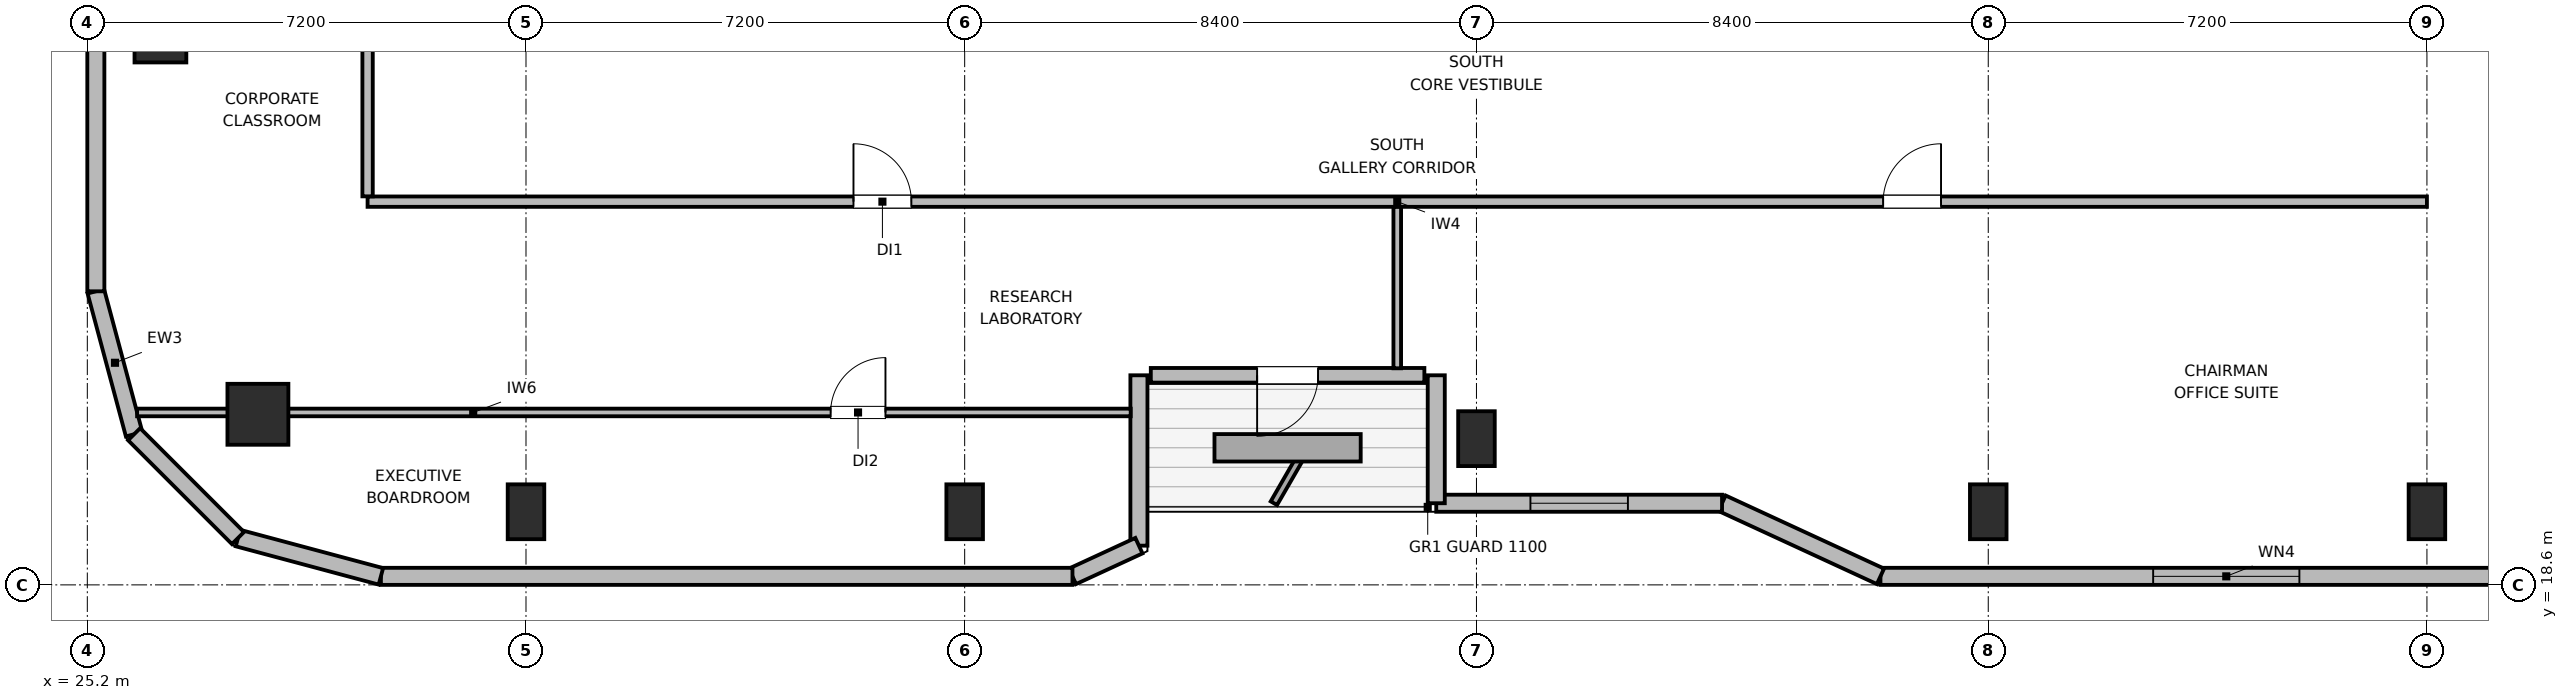
"""IFC4 building model, lengths in metres.
Left out: names, types, materials, properties, quantities, classifications, styles, units other than length and angle.
Written with IfcOpenShell. Run it as: python <this file> out.ifc"""

import sys

from ifc_helpers import new_model, si_unit, direction, frame, frame_2d, origin, origin_2d, place, context, subcontext, project, spatial, rectangle, circle, extrude, element, fill, save


model = new_model("IFC4")
c1 = context("Model", 3, precision=1e-05, world=origin(), true_north=direction((0.0, 1.0)))
c2 = subcontext(c1, "Body", "Model", "MODEL_VIEW")
j1 = project(units=[si_unit("LENGTHUNIT", "METRE"), si_unit("PLANEANGLEUNIT", "RADIAN")], contexts=[c1])
p1 = place(None, origin())
s1 = spatial("IfcSite", under=j1, at=p1, CompositionType="ELEMENT")
p2 = place(p1, origin())
s2 = spatial("IfcBuilding", under=s1, at=p2, CompositionType="ELEMENT")
p3 = place(p2, frame((0.0, 0.0, 342.0)))
s3 = spatial("IfcBuildingStorey", under=s2, at=p3, CompositionType="ELEMENT", Elevation=342.0)
p4 = place(p3, frame((28.0, 21.4, 0.0), z_axis=(0.0, 0.0, 1.0), x_axis=(1.0, 0.0, 0.0)))
e1 = element("IfcColumn", 1, at=p4, inside=s3, PredefinedType="COLUMN", context=c2, shape_type="SweptSolid", body=[
    extrude(circle(Radius=0.5, at=origin_2d()), origin(), (0.0, 0.0, 1.0), 4.5),
])
for number, where, z_axis, x_axis in (
    (2, (32.4, 19.8, 0.0), (0.0, 0.0, 1.0), (1.0, 0.0, 0.0)),
    (3, (39.6, 19.8, 0.0), (0.0, 0.0, 1.0), (1.0, 0.0, 0.0)),
    (4, (48.0, 21.0, 0.0), (0.0, 0.0, 1.0), (1.0, 0.0, 0.0)),
    (5, (56.4, 19.8, 0.0), (0.0, 0.0, 1.0), (1.0, 0.0, 0.0)),
    (6, (63.6, 19.8, 0.0), (0.0, 0.0, 1.0), (1.0, 0.0, 0.0)),
):
    element("IfcColumn", number, at=place(p3, frame(where, z_axis=z_axis, x_axis=x_axis)), inside=s3, PredefinedType="COLUMN", context=c2, shape_type="SweptSolid", body=[
        extrude(rectangle(XDim=0.6, YDim=0.9, at=origin_2d()), origin(), (0.0, 0.0, 1.0), 4.5),
    ])
p5 = place(p3, frame((26.4, 27.6, 0.0), z_axis=(0.0, 0.0, 1.0), x_axis=(1.0, 0.0, 0.0)))
e7 = element("IfcColumn", 7, at=p5, inside=s3, PredefinedType="COLUMN", context=c2, shape_type="SweptSolid", body=[
    extrude(rectangle(XDim=0.85, YDim=0.85, at=origin_2d()), origin(), (0.0, 0.0, 1.0), 4.5),
])
p6 = place(p3, frame((25.969, 21.073, 0.0), z_axis=(0.0, 0.0, 1.0), x_axis=(-0.258751159445, 0.965944013639, 0.0)))
e8 = element("IfcWall", 8, at=p6, inside=s3, PredefinedType="SOLIDWALL", context=c2, shape_type="SweptSolid", body=[
    extrude(rectangle(XDim=2.429, YDim=0.28, at=frame_2d((1.214, 0.0))), origin(), (0.0, 0.0, 1.0), 4.28),
])
p7 = place(p3, frame((25.34, 23.418, 0.0), z_axis=(0.0, 0.0, 1.0), x_axis=(0.0, 1.0, 0.0)))
e9 = element("IfcWall", 9, at=p7, inside=s3, PredefinedType="SOLIDWALL", context=c2, shape_type="SweptSolid", body=[
    extrude(rectangle(XDim=5.842, YDim=0.28, at=frame_2d((2.921, 0.0))), origin(), (0.0, 0.0, 1.0), 4.28),
])
p8 = place(p3, frame((65.982, 18.74, 0.0), z_axis=(0.0, 0.0, 1.0), x_axis=(-1.0, 0.0, 0.0)))
e10 = element("IfcWall", 10, at=p8, inside=s3, PredefinedType="SOLIDWALL", context=c2, shape_type="SweptSolid", body=[
    extrude(rectangle(XDim=11.351, YDim=0.28, at=frame_2d((5.676, 0.0))), origin(), (0.0, 0.0, 1.0), 4.28),
])
p9 = place(p8, frame((4.475, 0.0, 0.85)))
e11 = element("IfcOpeningElement", 11, at=p9, cuts=e10, PredefinedType="OPENING", context=c2, shape_type="SweptSolid", body=[
    extrude(rectangle(XDim=2.4, YDim=1.15, at=frame_2d((1.2, 0.575))), frame((0.0, 0.15, 0.0), z_axis=(0.0, -1.0, 0.0), x_axis=(1.0, 0.0, 0.0)), (0.0, 0.0, 1.0), 0.3),
])
p10 = place(p3, frame((54.631, 18.74, 0.0), z_axis=(0.0, 0.0, 1.0), x_axis=(-0.907956889006, 0.419063584324, 0.0)))
e12 = element("IfcWall", 12, at=p10, inside=s3, PredefinedType="SOLIDWALL", context=c2, shape_type="SweptSolid", body=[
    extrude(rectangle(XDim=2.864, YDim=0.28, at=frame_2d((1.432, 0.0))), origin(), (0.0, 0.0, 1.0), 2.865),
])
p11 = place(p3, frame((52.031, 19.94, 0.0), z_axis=(0.0, 0.0, 1.0), x_axis=(-1.0, 0.0, 0.0)))
e13 = element("IfcWall", 13, at=p11, inside=s3, PredefinedType="SOLIDWALL", context=c2, shape_type="SweptSolid", body=[
    extrude(rectangle(XDim=4.691, YDim=0.28, at=frame_2d((2.345, 0.0))), origin(), (0.0, 0.0, 1.0), 2.865),
])
p12 = place(p11, frame((1.545, 0.0, 0.85)))
e14 = element("IfcOpeningElement", 14, at=p12, cuts=e13, PredefinedType="OPENING", context=c2, shape_type="SweptSolid", body=[
    extrude(rectangle(XDim=1.6, YDim=1.0, at=frame_2d((0.8, 0.5))), frame((0.0, 0.15, 0.0), z_axis=(0.0, -1.0, 0.0), x_axis=(1.0, 0.0, 0.0)), (0.0, 0.0, 1.0), 0.3),
])
p13 = place(p3, frame((47.34, 19.94, 0.0), z_axis=(0.0, 0.0, 1.0), x_axis=(0.0, 1.0, 0.0)))
e15 = element("IfcWall", 15, at=p13, inside=s3, PredefinedType="SOLIDWALL", context=c2, shape_type="SweptSolid", body=[
    extrude(rectangle(XDim=2.1, YDim=0.28, at=frame_2d((1.05, 0.0))), origin(), (0.0, 0.0, 1.0), 2.865),
])
p14 = place(p3, frame((47.145, 22.04, 0.0), z_axis=(0.0, 0.0, 1.0), x_axis=(-1.0, 0.0, 0.0)))
e16 = element("IfcWall", 16, at=p14, inside=s3, PredefinedType="SOLIDWALL", context=c2, shape_type="SweptSolid", body=[
    extrude(rectangle(XDim=4.49, YDim=0.24, at=frame_2d((2.245, 0.0))), origin(), (0.0, 0.0, 1.0), 4.28),
])
p15 = place(p14, frame((1.745, 0.0, 0.0)))
e17 = element("IfcOpeningElement", 17, at=p15, cuts=e16, PredefinedType="OPENING", context=c2, shape_type="SweptSolid", body=[
    extrude(rectangle(XDim=1.0, YDim=2.02, at=frame_2d((0.5, 1.01))), frame((0.0, 0.13, 0.0), z_axis=(0.0, -1.0, 0.0), x_axis=(1.0, 0.0, 0.0)), (0.0, 0.0, 1.0), 0.26),
])
p16 = place(p3, frame((42.46, 22.04, 0.0), z_axis=(0.0, 0.0, 1.0), x_axis=(0.0, -1.0, 0.0)))
e18 = element("IfcWall", 18, at=p16, inside=s3, PredefinedType="SOLIDWALL", context=c2, shape_type="SweptSolid", body=[
    extrude(rectangle(XDim=2.796, YDim=0.28, at=frame_2d((1.398, 0.0))), origin(), (0.0, 0.0, 1.0), 2.865),
])
p17 = place(p3, frame((42.46, 19.244, 0.0), z_axis=(0.0, 0.0, 1.0), x_axis=(-0.907893953211, -0.419199916176, 0.0)))
e19 = element("IfcWall", 19, at=p17, inside=s3, PredefinedType="SOLIDWALL", context=c2, shape_type="SweptSolid", body=[
    extrude(rectangle(XDim=1.201, YDim=0.28, at=frame_2d((0.601, 0.0))), origin(), (0.0, 0.0, 1.0), 4.28),
])
p18 = place(p3, frame((41.369, 18.74, 0.0), z_axis=(0.0, 0.0, 1.0), x_axis=(-1.0, 0.0, 0.0)))
e20 = element("IfcWall", 20, at=p18, inside=s3, PredefinedType="SOLIDWALL", context=c2, shape_type="SweptSolid", body=[
    extrude(rectangle(XDim=11.351, YDim=0.28, at=frame_2d((5.675, 0.0))), origin(), (0.0, 0.0, 1.0), 4.28),
])
p19 = place(p3, frame((30.018, 18.74, 0.0), z_axis=(0.0, 0.0, 1.0), x_axis=(-0.965937282298, 0.25877628691, 0.0)))
e21 = element("IfcWall", 21, at=p19, inside=s3, PredefinedType="SOLIDWALL", context=c2, shape_type="SweptSolid", body=[
    extrude(rectangle(XDim=2.428, YDim=0.28, at=frame_2d((1.214, 0.0))), origin(), (0.0, 0.0, 1.0), 4.28),
])
p20 = place(p3, frame((27.673, 19.368, 0.0), z_axis=(0.0, 0.0, 1.0), x_axis=(-0.707106781187, 0.707106781187, 0.0)))
e22 = element("IfcWall", 22, at=p20, inside=s3, PredefinedType="SOLIDWALL", context=c2, shape_type="SweptSolid", body=[
    extrude(rectangle(XDim=2.41, YDim=0.28, at=frame_2d((1.205, 0.0))), origin(), (0.0, 0.0, 1.0), 4.28),
])
p21 = place(p3, frame((29.8, 24.89, 0.0), z_axis=(0.0, 0.0, 1.0), x_axis=(1.0, 0.0, 0.0)))
e23 = element("IfcWall", 23, at=p21, inside=s3, PredefinedType="PARTITIONING", context=c2, shape_type="SweptSolid", body=[
    extrude(rectangle(XDim=33.8, YDim=0.17, at=frame_2d((16.9, 0.0))), origin(), (0.0, 0.0, 1.0), 4.28),
])
p22 = place(p21, frame((7.975, 0.0, 0.0)))
e24 = element("IfcOpeningElement", 24, at=p22, cuts=e23, PredefinedType="OPENING", context=c2, shape_type="SweptSolid", body=[
    extrude(rectangle(XDim=0.95, YDim=2.04, at=frame_2d((0.475, 1.02))), frame((0.0, 0.095, 0.0), z_axis=(0.0, -1.0, 0.0), x_axis=(1.0, 0.0, 0.0)), (0.0, 0.0, 1.0), 0.19),
])
p23 = place(p21, frame((24.875, 0.0, 0.0)))
e25 = element("IfcOpeningElement", 25, at=p23, cuts=e23, PredefinedType="OPENING", context=c2, shape_type="SweptSolid", body=[
    extrude(rectangle(XDim=0.95, YDim=2.04, at=frame_2d((0.475, 1.02))), frame((0.0, 0.095, 0.0), z_axis=(0.0, -1.0, 0.0), x_axis=(1.0, 0.0, 0.0)), (0.0, 0.0, 1.0), 0.19),
])
p24 = place(p3, frame((29.8, 24.977, 0.0), z_axis=(0.0, 0.0, 1.0), x_axis=(0.0, 1.0, 0.0)))
e26 = element("IfcWall", 26, at=p24, inside=s3, PredefinedType="PARTITIONING", context=c2, shape_type="SweptSolid", body=[
    extrude(rectangle(XDim=22.046, YDim=0.17, at=frame_2d((11.023, 0.0))), origin(), (0.0, 0.0, 1.0), 4.28),
])
p25 = place(p24, frame((3.693, 0.0, 0.0)))
e27 = element("IfcOpeningElement", 27, at=p25, cuts=e26, PredefinedType="OPENING", context=c2, shape_type="SweptSolid", body=[
    extrude(rectangle(XDim=0.95, YDim=2.04, at=frame_2d((0.475, 1.02))), frame((0.0, 0.095, 0.0), z_axis=(0.0, -1.0, 0.0), x_axis=(1.0, 0.0, 0.0)), (0.0, 0.0, 1.0), 0.19),
])
p26 = place(p24, frame((11.148, 0.0, 0.0)))
e28 = element("IfcOpeningElement", 28, at=p26, cuts=e26, PredefinedType="OPENING", context=c2, shape_type="SweptSolid", body=[
    extrude(rectangle(XDim=0.95, YDim=2.04, at=frame_2d((0.475, 1.02))), frame((0.0, 0.095, 0.0), z_axis=(0.0, -1.0, 0.0), x_axis=(1.0, 0.0, 0.0)), (0.0, 0.0, 1.0), 0.19),
])
p27 = place(p24, frame((18.003, 0.0, 0.0)))
e29 = element("IfcOpeningElement", 29, at=p27, cuts=e26, PredefinedType="OPENING", context=c2, shape_type="SweptSolid", body=[
    extrude(rectangle(XDim=0.95, YDim=2.04, at=frame_2d((0.475, 1.02))), frame((0.0, 0.095, 0.0), z_axis=(0.0, -1.0, 0.0), x_axis=(1.0, 0.0, 0.0)), (0.0, 0.0, 1.0), 0.19),
])
p28 = place(p3, frame((26.017, 21.43, 0.0), z_axis=(0.0, 0.0, 1.0), x_axis=(1.0, 0.0, 0.0)))
e30 = element("IfcWall", 30, at=p28, inside=s3, PredefinedType="PARTITIONING", context=c2, shape_type="SweptSolid", body=[
    extrude(rectangle(XDim=16.308, YDim=0.125, at=frame_2d((8.154, 0.0))), origin(), (0.0, 0.0, 1.0), 2.865),
])
p29 = place(p28, frame((11.383, 0.0, 0.0)))
e31 = element("IfcOpeningElement", 31, at=p29, cuts=e30, PredefinedType="OPENING", context=c2, shape_type="SweptSolid", body=[
    extrude(rectangle(XDim=0.9, YDim=2.02, at=frame_2d((0.45, 1.01))), frame((0.0, 0.073, 0.0), z_axis=(0.0, -1.0, 0.0), x_axis=(1.0, 0.0, 0.0)), (0.0, 0.0, 1.0), 0.145),
])
p30 = place(p3, frame((46.7, 22.155, 0.0), z_axis=(0.0, 0.0, 1.0), x_axis=(0.0, 1.0, 0.0)))
e32 = element("IfcWall", 32, at=p30, inside=s3, PredefinedType="PARTITIONING", context=c2, shape_type="SweptSolid", body=[
    extrude(rectangle(XDim=2.648, YDim=0.125, at=frame_2d((1.324, 0.0))), origin(), (0.0, 0.0, 1.0), 4.28),
])
p31 = place(p9, origin())
e33 = element("IfcWindow", 33, at=p31, inside=s3, PartitioningType="SINGLE_PANEL", PredefinedType="WINDOW", context=c2, shape_type="SweptSolid", body=[
    extrude(rectangle(XDim=2.4, YDim=1.15, at=frame_2d((1.2, 0.575))), frame((0.0, 0.03, 0.0), z_axis=(0.0, -1.0, 0.0), x_axis=(1.0, 0.0, 0.0)), (0.0, 0.0, 1.0), 0.06),
])
fill(e11, e33)
p32 = place(p12, origin())
e34 = element("IfcWindow", 34, at=p32, inside=s3, PartitioningType="SINGLE_PANEL", PredefinedType="WINDOW", context=c2, shape_type="SweptSolid", body=[
    extrude(rectangle(XDim=1.6, YDim=1.0, at=frame_2d((0.8, 0.5))), frame((0.0, 0.03, 0.0), z_axis=(0.0, -1.0, 0.0), x_axis=(1.0, 0.0, 0.0)), (0.0, 0.0, 1.0), 0.06),
])
fill(e14, e34)
p33 = place(p15, origin())
e35 = element("IfcDoor", 35, at=p33, inside=s3, OperationType="SINGLE_SWING_RIGHT", PredefinedType="DOOR", context=c2, shape_type="SweptSolid", body=[
    extrude(rectangle(XDim=1.0, YDim=2.02, at=frame_2d((0.5, 1.01))), frame((0.0, 0.025, 0.0), z_axis=(0.0, -1.0, 0.0), x_axis=(1.0, 0.0, 0.0)), (0.0, 0.0, 1.0), 0.05),
])
fill(e17, e35)
p34 = place(p29, origin())
e36 = element("IfcDoor", 36, at=p34, inside=s3, OperationType="SINGLE_SWING_RIGHT", PredefinedType="DOOR", context=c2, shape_type="SweptSolid", body=[
    extrude(rectangle(XDim=0.9, YDim=2.02, at=frame_2d((0.45, 1.01))), frame((0.0, 0.025, 0.0), z_axis=(0.0, -1.0, 0.0), x_axis=(1.0, 0.0, 0.0)), (0.0, 0.0, 1.0), 0.05),
])
fill(e31, e36)
p35 = place(p22, origin())
e37 = element("IfcDoor", 37, at=p35, inside=s3, OperationType="SINGLE_SWING_LEFT", PredefinedType="DOOR", context=c2, shape_type="SweptSolid", body=[
    extrude(rectangle(XDim=0.95, YDim=2.04, at=frame_2d((0.475, 1.02))), frame((0.0, 0.025, 0.0), z_axis=(0.0, -1.0, 0.0), x_axis=(1.0, 0.0, 0.0)), (0.0, 0.0, 1.0), 0.05),
])
fill(e24, e37)
p36 = place(p23, origin())
e38 = element("IfcDoor", 38, at=p36, inside=s3, OperationType="SINGLE_SWING_RIGHT", PredefinedType="DOOR", context=c2, shape_type="SweptSolid", body=[
    extrude(rectangle(XDim=0.95, YDim=2.04, at=frame_2d((0.475, 1.02))), frame((0.0, 0.025, 0.0), z_axis=(0.0, -1.0, 0.0), x_axis=(1.0, 0.0, 0.0)), (0.0, 0.0, 1.0), 0.05),
])
fill(e25, e38)
save(model, sys.argv[1])
